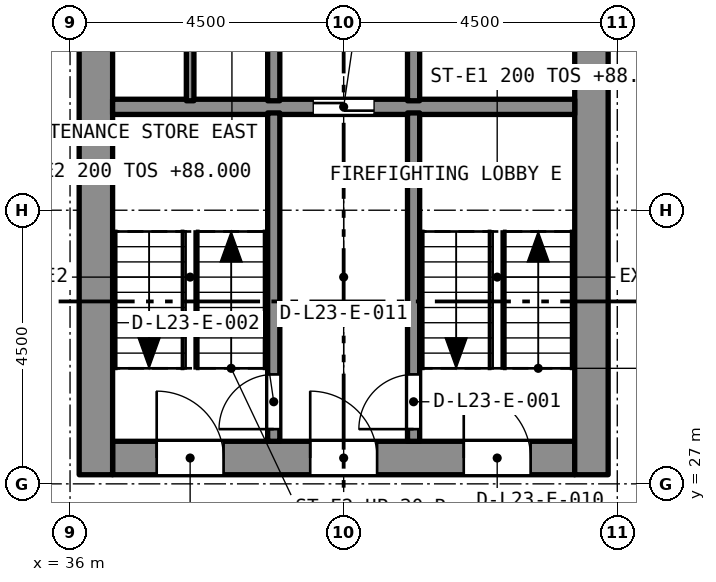
"""IFC4 building model, lengths in metres.
Left out: names, types, materials, properties, quantities, classifications, styles, units other than length and angle.
Written with IfcOpenShell. Run it as: python <this file> out.ifc"""

import sys

from ifc_helpers import new_model, si_unit, direction, frame, frame_2d, origin, place, context, subcontext, project, spatial, rectangle, extrude, element, fill, save


model = new_model("IFC4")
c1 = context("Model", 3, precision=1e-05, world=origin(), true_north=direction((0.0, 1.0)))
c2 = subcontext(c1, "Body", "Model", "MODEL_VIEW")
j1 = project(units=[si_unit("LENGTHUNIT", "METRE"), si_unit("PLANEANGLEUNIT", "RADIAN")], contexts=[c1])
p1 = place(None, origin())
s1 = spatial("IfcSite", under=j1, at=p1, CompositionType="ELEMENT")
p2 = place(p1, origin())
s2 = spatial("IfcBuilding", under=s1, at=p2, CompositionType="ELEMENT")
p3 = place(p2, frame((0.0, 0.0, 86.4)))
s3 = spatial("IfcBuildingStorey", under=s2, at=p3, CompositionType="ELEMENT", Elevation=86.4)
p4 = place(p3, frame((36.7, 27.425, 0.0), z_axis=(0.0, 0.0, 1.0), x_axis=(1.0, 0.0, 0.0)))
e1 = element("IfcWall", 1, at=p4, inside=s3, PredefinedType="SOLIDWALL", context=c2, shape_type="SweptSolid", body=[
    extrude(rectangle(XDim=7.6, YDim=0.55, at=frame_2d((3.8, 0.0))), origin(), (0.0, 0.0, 1.0), 3.2),
])
p5 = place(p4, frame((5.775, 0.0, 0.0)))
e2 = element("IfcOpeningElement", 2, at=p5, cuts=e1, PredefinedType="OPENING", context=c2, shape_type="SweptSolid", body=[
    extrude(rectangle(XDim=1.1, YDim=2.1, at=frame_2d((0.55, 1.05))), frame((0.0, 0.285, 0.0), z_axis=(0.0, -1.0, 0.0), x_axis=(1.0, 0.0, 0.0)), (0.0, 0.0, 1.0), 0.57),
])
p6 = place(p4, frame((3.25, 0.0, 0.0)))
e3 = element("IfcOpeningElement", 3, at=p6, cuts=e1, PredefinedType="OPENING", context=c2, shape_type="SweptSolid", body=[
    extrude(rectangle(XDim=1.1, YDim=2.1, at=frame_2d((0.55, 1.05))), frame((0.0, 0.285, 0.0), z_axis=(0.0, -1.0, 0.0), x_axis=(1.0, 0.0, 0.0)), (0.0, 0.0, 1.0), 0.57),
])
p7 = place(p4, frame((0.725, 0.0, 0.0)))
e4 = element("IfcOpeningElement", 4, at=p7, cuts=e1, PredefinedType="OPENING", context=c2, shape_type="SweptSolid", body=[
    extrude(rectangle(XDim=1.1, YDim=2.1, at=frame_2d((0.55, 1.05))), frame((0.0, 0.285, 0.0), z_axis=(0.0, -1.0, 0.0), x_axis=(1.0, 0.0, 0.0)), (0.0, 0.0, 1.0), 0.57),
])
p8 = place(p3, frame((36.425, 27.15, 0.0), z_axis=(0.0, 0.0, 1.0), x_axis=(0.0, 1.0, 0.0)))
e5 = element("IfcWall", 5, at=p8, inside=s3, PredefinedType="SOLIDWALL", context=c2, shape_type="SweptSolid", body=[
    extrude(rectangle(XDim=13.2, YDim=0.55, at=frame_2d((6.6, 0.0))), origin(), (0.0, 0.0, 1.0), 3.2),
])
p9 = place(p8, frame((8.8, 0.0, 0.0)))
e6 = element("IfcOpeningElement", 6, at=p9, cuts=e5, PredefinedType="OPENING", context=c2, shape_type="SweptSolid", body=[
    extrude(rectangle(XDim=1.2, YDim=2.1, at=frame_2d((0.6, 1.05))), frame((0.0, 0.285, 0.0), z_axis=(0.0, -1.0, 0.0), x_axis=(1.0, 0.0, 0.0)), (0.0, 0.0, 1.0), 0.57),
])
p10 = place(p3, frame((44.575, 27.15, 0.0), z_axis=(0.0, 0.0, 1.0), x_axis=(0.0, 1.0, 0.0)))
e7 = element("IfcWall", 7, at=p10, inside=s3, PredefinedType="SOLIDWALL", context=c2, shape_type="SweptSolid", body=[
    extrude(rectangle(XDim=13.2, YDim=0.55, at=frame_2d((6.6, 0.0))), origin(), (0.0, 0.0, 1.0), 3.2),
])
p11 = place(p10, frame((8.8, 0.0, 0.0)))
e8 = element("IfcOpeningElement", 8, at=p11, cuts=e7, PredefinedType="OPENING", context=c2, shape_type="SweptSolid", body=[
    extrude(rectangle(XDim=1.2, YDim=2.1, at=frame_2d((0.6, 1.05))), frame((0.0, 0.285, 0.0), z_axis=(0.0, -1.0, 0.0), x_axis=(1.0, 0.0, 0.0)), (0.0, 0.0, 1.0), 0.57),
])
p12 = place(p3, frame((36.7, 33.2, 0.0), z_axis=(0.0, 0.0, 1.0), x_axis=(1.0, 0.0, 0.0)))
e9 = element("IfcWall", 9, at=p12, inside=s3, PredefinedType="SOLIDWALL", context=c2, shape_type="SweptSolid", body=[
    extrude(rectangle(XDim=7.6, YDim=0.25, at=frame_2d((3.8, 0.0))), origin(), (0.0, 0.0, 1.0), 2.9),
])
p13 = place(p12, frame((3.3, 0.0, 0.0)))
e10 = element("IfcOpeningElement", 10, at=p13, cuts=e9, PredefinedType="OPENING", context=c2, shape_type="SweptSolid", body=[
    extrude(rectangle(XDim=1.0, YDim=2.1, at=frame_2d((0.5, 1.05))), frame((0.0, 0.135, 0.0), z_axis=(0.0, -1.0, 0.0), x_axis=(1.0, 0.0, 0.0)), (0.0, 0.0, 1.0), 0.27),
])
p14 = place(p3, frame((41.65, 27.7, 0.0), z_axis=(0.0, 0.0, 1.0), x_axis=(0.0, 1.0, 0.0)))
e11 = element("IfcWall", 11, at=p14, inside=s3, PredefinedType="SOLIDWALL", context=c2, shape_type="SweptSolid", body=[
    extrude(rectangle(XDim=5.4, YDim=0.2, at=frame_2d((2.7, 0.0))), origin(), (0.0, 0.0, 1.0), 2.9),
])
p15 = place(p14, frame((0.2, 0.0, 0.0)))
e12 = element("IfcOpeningElement", 12, at=p15, cuts=e11, PredefinedType="OPENING", context=c2, shape_type="SweptSolid", body=[
    extrude(rectangle(XDim=0.9, YDim=2.1, at=frame_2d((0.45, 1.05))), frame((0.0, 0.11, 0.0), z_axis=(0.0, -1.0, 0.0), x_axis=(1.0, 0.0, 0.0)), (0.0, 0.0, 1.0), 0.22),
])
p16 = place(p3, frame((39.35, 27.7, 0.0), z_axis=(0.0, 0.0, 1.0), x_axis=(0.0, 1.0, 0.0)))
e13 = element("IfcWall", 13, at=p16, inside=s3, PredefinedType="SOLIDWALL", context=c2, shape_type="SweptSolid", body=[
    extrude(rectangle(XDim=5.4, YDim=0.2, at=frame_2d((2.7, 0.0))), origin(), (0.0, 0.0, 1.0), 2.9),
])
p17 = place(p16, frame((0.2, 0.0, 0.0)))
e14 = element("IfcOpeningElement", 14, at=p17, cuts=e13, PredefinedType="OPENING", context=c2, shape_type="SweptSolid", body=[
    extrude(rectangle(XDim=0.9, YDim=2.1, at=frame_2d((0.45, 1.05))), frame((0.0, 0.11, 0.0), z_axis=(0.0, -1.0, 0.0), x_axis=(1.0, 0.0, 0.0)), (0.0, 0.0, 1.0), 0.22),
])
for number, where, z_axis, x_axis in (
    (15, (41.65, 33.3, 0.0), (0.0, 0.0, 1.0), (0.0, 1.0, 0.0)),
    (16, (39.35, 33.3, 0.0), (0.0, 0.0, 1.0), (0.0, 1.0, 0.0)),
):
    element("IfcWall", number, at=place(p3, frame(where, z_axis=z_axis, x_axis=x_axis)), inside=s3, PredefinedType="SOLIDWALL", context=c2, shape_type="SweptSolid", body=[
        extrude(rectangle(XDim=2.3, YDim=0.2, at=frame_2d((1.15, 0.0))), origin(), (0.0, 0.0, 1.0), 2.9),
    ])
p18 = place(p3, frame((37.975, 33.3, 0.0), z_axis=(0.0, 0.0, 1.0), x_axis=(0.0, 1.0, 0.0)))
e17 = element("IfcWall", 17, at=p18, inside=s3, PredefinedType="PARTITIONING", context=c2, shape_type="SweptSolid", body=[
    extrude(rectangle(XDim=2.3, YDim=0.125, at=frame_2d((1.15, 0.0))), origin(), (0.0, 0.0, 1.0), 2.9),
])
p19 = place(p15, origin())
e18 = element("IfcDoor", 18, at=p19, inside=s3, OperationType="SINGLE_SWING_LEFT", PredefinedType="DOOR", context=c2, shape_type="SweptSolid", body=[
    extrude(rectangle(XDim=0.9, YDim=2.1, at=frame_2d((0.45, 1.05))), frame((0.0, 0.025, 0.0), z_axis=(0.0, -1.0, 0.0), x_axis=(1.0, 0.0, 0.0)), (0.0, 0.0, 1.0), 0.05),
])
fill(e12, e18)
p20 = place(p17, origin())
e19 = element("IfcDoor", 19, at=p20, inside=s3, OperationType="SINGLE_SWING_LEFT", PredefinedType="DOOR", context=c2, shape_type="SweptSolid", body=[
    extrude(rectangle(XDim=0.9, YDim=2.1, at=frame_2d((0.45, 1.05))), frame((0.0, 0.025, 0.0), z_axis=(0.0, -1.0, 0.0), x_axis=(1.0, 0.0, 0.0)), (0.0, 0.0, 1.0), 0.05),
])
fill(e14, e19)
p21 = place(p13, origin())
e20 = element("IfcDoor", 20, at=p21, inside=s3, OperationType="SLIDING_TO_LEFT", PredefinedType="DOOR", context=c2, shape_type="SweptSolid", body=[
    extrude(rectangle(XDim=1.0, YDim=2.1, at=frame_2d((0.5, 1.05))), frame((0.0, 0.025, 0.0), z_axis=(0.0, -1.0, 0.0), x_axis=(1.0, 0.0, 0.0)), (0.0, 0.0, 1.0), 0.05),
])
fill(e10, e20)
p22 = place(p5, origin())
e21 = element("IfcDoor", 21, at=p22, inside=s3, OperationType="SINGLE_SWING_LEFT", PredefinedType="DOOR", context=c2, shape_type="SweptSolid", body=[
    extrude(rectangle(XDim=1.1, YDim=2.1, at=frame_2d((0.55, 1.05))), frame((0.0, 0.025, 0.0), z_axis=(0.0, -1.0, 0.0), x_axis=(1.0, 0.0, 0.0)), (0.0, 0.0, 1.0), 0.05),
])
fill(e2, e21)
p23 = place(p6, origin())
e22 = element("IfcDoor", 22, at=p23, inside=s3, OperationType="SINGLE_SWING_LEFT", PredefinedType="DOOR", context=c2, shape_type="SweptSolid", body=[
    extrude(rectangle(XDim=1.1, YDim=2.1, at=frame_2d((0.55, 1.05))), frame((0.0, 0.025, 0.0), z_axis=(0.0, -1.0, 0.0), x_axis=(1.0, 0.0, 0.0)), (0.0, 0.0, 1.0), 0.05),
])
fill(e3, e22)
p24 = place(p7, origin())
e23 = element("IfcDoor", 23, at=p24, inside=s3, OperationType="SINGLE_SWING_LEFT", PredefinedType="DOOR", context=c2, shape_type="SweptSolid", body=[
    extrude(rectangle(XDim=1.1, YDim=2.1, at=frame_2d((0.55, 1.05))), frame((0.0, 0.025, 0.0), z_axis=(0.0, -1.0, 0.0), x_axis=(1.0, 0.0, 0.0)), (0.0, 0.0, 1.0), 0.05),
])
fill(e4, e23)
save(model, sys.argv[1])
